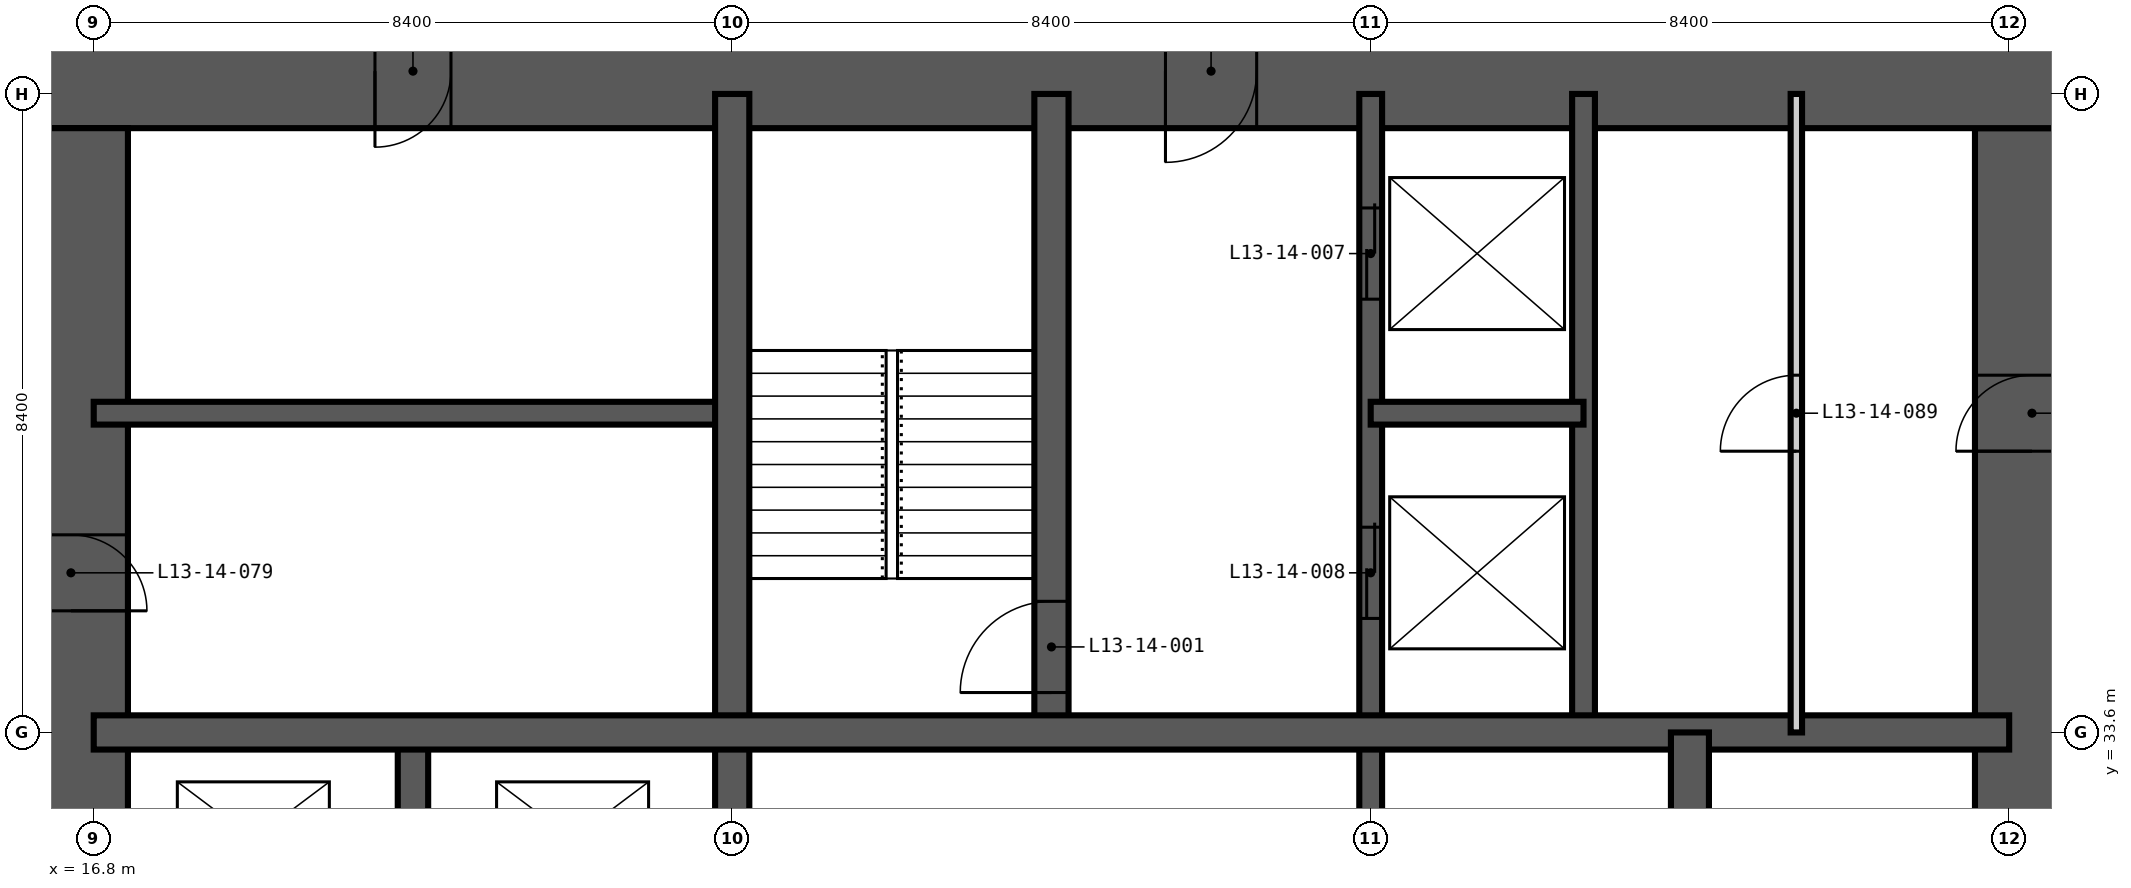
"""IFC4 building model, lengths in metres.
Left out: names, types, materials, properties, quantities, classifications, styles, units other than length and angle.
Written with IfcOpenShell. Run it as: python <this file> out.ifc"""

import sys

from ifc_helpers import new_model, si_unit, direction, frame, frame_2d, origin, place, context, subcontext, project, spatial, rectangle, extrude, element, fill, save


model = new_model("IFC4")
c1 = context("Model", 3, precision=1e-05, world=origin(), true_north=direction((0.0, 1.0)))
c2 = subcontext(c1, "Body", "Model", "MODEL_VIEW")
j1 = project(units=[si_unit("LENGTHUNIT", "METRE"), si_unit("PLANEANGLEUNIT", "RADIAN")], contexts=[c1])
p1 = place(None, origin())
s1 = spatial("IfcSite", under=j1, at=p1, CompositionType="ELEMENT")
p2 = place(p1, origin())
s2 = spatial("IfcBuilding", under=s1, at=p2, CompositionType="ELEMENT")
p3 = place(p2, frame((0.0, 0.0, 55.8)))
s3 = spatial("IfcBuildingStorey", under=s2, at=p3, CompositionType="ELEMENT", Elevation=55.8)
p4 = place(p3, frame((42.3, 17.25, -0.35), z_axis=(0.0, 0.0, 1.0), x_axis=(0.0, 1.0, 0.0)))
e1 = element("IfcWall", 1, at=p4, inside=s3, PredefinedType="SHEAR", context=c2, shape_type="SweptSolid", body=[
    extrude(rectangle(XDim=24.3, YDim=1.5, at=frame_2d((12.15, 0.0))), origin(), (0.0, 0.0, 1.0), 3.6),
])
p5 = place(p4, frame((0.35, 0.0, 0.35)))
e2 = element("IfcOpeningElement", 2, at=p5, cuts=e1, PredefinedType="OPENING", context=c2, shape_type="SweptSolid", body=[
    extrude(rectangle(XDim=1.2, YDim=2.2, at=frame_2d((0.6, 1.1))), frame((0.0, 0.76, 0.0), z_axis=(0.0, -1.0, 0.0), x_axis=(1.0, 0.0, 0.0)), (0.0, 0.0, 1.0), 1.52),
])
p6 = place(p4, frame((11.65, 0.0, 0.35)))
e3 = element("IfcOpeningElement", 3, at=p6, cuts=e1, PredefinedType="OPENING", context=c2, shape_type="SweptSolid", body=[
    extrude(rectangle(XDim=1.0, YDim=2.1, at=frame_2d((0.5, 1.05))), frame((0.0, 0.76, 0.0), z_axis=(0.0, -1.0, 0.0), x_axis=(1.0, 0.0, 0.0)), (0.0, 0.0, 1.0), 1.52),
])
p7 = place(p4, frame((20.05, 0.0, 0.35)))
e4 = element("IfcOpeningElement", 4, at=p7, cuts=e1, PredefinedType="OPENING", context=c2, shape_type="SweptSolid", body=[
    extrude(rectangle(XDim=1.0, YDim=2.1, at=frame_2d((0.5, 1.05))), frame((0.0, 0.76, 0.0), z_axis=(0.0, -1.0, 0.0), x_axis=(1.0, 0.0, 0.0)), (0.0, 0.0, 1.0), 1.52),
])
p8 = place(p3, frame((43.05, 42.3, -0.35), z_axis=(0.0, 0.0, 1.0), x_axis=(-1.0, 0.0, 0.0)))
e5 = element("IfcWall", 5, at=p8, inside=s3, PredefinedType="SHEAR", context=c2, shape_type="SweptSolid", body=[
    extrude(rectangle(XDim=27.3, YDim=1.5, at=frame_2d((13.65, 0.0))), origin(), (0.0, 0.0, 1.0), 3.6),
])
p9 = place(p8, frame((21.55, 0.0, 0.35)))
e6 = element("IfcOpeningElement", 6, at=p9, cuts=e5, PredefinedType="OPENING", context=c2, shape_type="SweptSolid", body=[
    extrude(rectangle(XDim=1.0, YDim=2.1, at=frame_2d((0.5, 1.05))), frame((0.0, 0.76, 0.0), z_axis=(0.0, -1.0, 0.0), x_axis=(1.0, 0.0, 0.0)), (0.0, 0.0, 1.0), 1.52),
])
p10 = place(p8, frame((10.95, 0.0, 0.35)))
e7 = element("IfcOpeningElement", 7, at=p10, cuts=e5, PredefinedType="OPENING", context=c2, shape_type="SweptSolid", body=[
    extrude(rectangle(XDim=1.2, YDim=2.2, at=frame_2d((0.6, 1.1))), frame((0.0, 0.76, 0.0), z_axis=(0.0, -1.0, 0.0), x_axis=(1.0, 0.0, 0.0)), (0.0, 0.0, 1.0), 1.52),
])
p11 = place(p3, frame((16.5, 41.55, -0.35), z_axis=(0.0, 0.0, 1.0), x_axis=(0.0, -1.0, 0.0)))
e8 = element("IfcWall", 8, at=p11, inside=s3, PredefinedType="SHEAR", context=c2, shape_type="SweptSolid", body=[
    extrude(rectangle(XDim=24.3, YDim=1.5, at=frame_2d((12.15, 0.0))), origin(), (0.0, 0.0, 1.0), 3.6),
])
p12 = place(p11, frame((11.25, 0.0, 0.35)))
e9 = element("IfcOpeningElement", 9, at=p12, cuts=e8, PredefinedType="OPENING", context=c2, shape_type="SweptSolid", body=[
    extrude(rectangle(XDim=1.8, YDim=2.2, at=frame_2d((0.9, 1.1))), frame((0.0, 0.76, 0.0), z_axis=(0.0, -1.0, 0.0), x_axis=(1.0, 0.0, 0.0)), (0.0, 0.0, 1.0), 1.52),
])
p13 = place(p11, frame((20.05, 0.0, 0.35)))
e10 = element("IfcOpeningElement", 10, at=p13, cuts=e8, PredefinedType="OPENING", context=c2, shape_type="SweptSolid", body=[
    extrude(rectangle(XDim=1.0, YDim=2.1, at=frame_2d((0.5, 1.05))), frame((0.0, 0.76, 0.0), z_axis=(0.0, -1.0, 0.0), x_axis=(1.0, 0.0, 0.0)), (0.0, 0.0, 1.0), 1.52),
])
p14 = place(p11, frame((5.35, 0.0, 0.35)))
e11 = element("IfcOpeningElement", 11, at=p14, cuts=e8, PredefinedType="OPENING", context=c2, shape_type="SweptSolid", body=[
    extrude(rectangle(XDim=1.0, YDim=2.1, at=frame_2d((0.5, 1.05))), frame((0.0, 0.76, 0.0), z_axis=(0.0, -1.0, 0.0), x_axis=(1.0, 0.0, 0.0)), (0.0, 0.0, 1.0), 1.52),
])
p15 = place(p3, frame((33.6, 16.8, -0.35), z_axis=(0.0, 0.0, 1.0), x_axis=(0.0, 1.0, 0.0)))
e12 = element("IfcWall", 12, at=p15, inside=s3, PredefinedType="SHEAR", context=c2, shape_type="SweptSolid", body=[
    extrude(rectangle(XDim=25.2, YDim=0.3, at=frame_2d((12.6, 0.0))), origin(), (0.0, 0.0, 1.0), 3.6),
])
p16 = place(p15, frame((22.5, 0.0, 0.35)))
e13 = element("IfcOpeningElement", 13, at=p16, cuts=e12, PredefinedType="OPENING", context=c2, shape_type="SweptSolid", body=[
    extrude(rectangle(XDim=1.2, YDim=2.2, at=frame_2d((0.6, 1.1))), frame((0.0, 0.16, 0.0), z_axis=(0.0, -1.0, 0.0), x_axis=(1.0, 0.0, 0.0)), (0.0, 0.0, 1.0), 0.32),
])
p17 = place(p15, frame((18.3, 0.0, 0.35)))
e14 = element("IfcOpeningElement", 14, at=p17, cuts=e12, PredefinedType="OPENING", context=c2, shape_type="SweptSolid", body=[
    extrude(rectangle(XDim=1.2, YDim=2.2, at=frame_2d((0.6, 1.1))), frame((0.0, 0.16, 0.0), z_axis=(0.0, -1.0, 0.0), x_axis=(1.0, 0.0, 0.0)), (0.0, 0.0, 1.0), 0.32),
])
p18 = place(p15, frame((12.1, 0.0, 0.35)))
e15 = element("IfcOpeningElement", 15, at=p18, cuts=e12, PredefinedType="OPENING", context=c2, shape_type="SweptSolid", body=[
    extrude(rectangle(XDim=1.0, YDim=2.1, at=frame_2d((0.5, 1.05))), frame((0.0, 0.16, 0.0), z_axis=(0.0, -1.0, 0.0), x_axis=(1.0, 0.0, 0.0)), (0.0, 0.0, 1.0), 0.32),
])
for number, where, z_axis, x_axis in (
    (16, (36.4, 33.6, -0.35), (0.0, 0.0, 1.0), (0.0, 1.0, 0.0)),
    (17, (16.8, 37.8, -0.35), (0.0, 0.0, 1.0), (1.0, 0.0, 0.0)),
):
    element("IfcWall", number, at=place(p3, frame(where, z_axis=z_axis, x_axis=x_axis)), inside=s3, PredefinedType="SHEAR", context=c2, shape_type="SweptSolid", body=[
        extrude(rectangle(XDim=8.4, YDim=0.3, at=frame_2d((4.2, 0.0))), origin(), (0.0, 0.0, 1.0), 3.6),
    ])
p19 = place(p3, frame((33.6, 37.8, -0.35), z_axis=(0.0, 0.0, 1.0), x_axis=(1.0, 0.0, 0.0)))
e18 = element("IfcWall", 18, at=p19, inside=s3, PredefinedType="SHEAR", context=c2, shape_type="SweptSolid", body=[
    extrude(rectangle(XDim=2.8, YDim=0.3, at=frame_2d((1.4, 0.0))), origin(), (0.0, 0.0, 1.0), 3.6),
])
p20 = place(p3, frame((21.0, 30.8, -0.35), z_axis=(0.0, 0.0, 1.0), x_axis=(0.0, 1.0, 0.0)))
e19 = element("IfcWall", 19, at=p20, inside=s3, PredefinedType="SHEAR", context=c2, shape_type="SweptSolid", body=[
    extrude(rectangle(XDim=2.8, YDim=0.4, at=frame_2d((1.4, 0.0))), origin(), (0.0, 0.0, 1.0), 3.6),
])
p21 = place(p3, frame((25.2, 16.8, -0.35), z_axis=(0.0, 0.0, 1.0), x_axis=(0.0, 1.0, 0.0)))
e20 = element("IfcWall", 20, at=p21, inside=s3, PredefinedType="SHEAR", context=c2, shape_type="SweptSolid", body=[
    extrude(rectangle(XDim=25.2, YDim=0.45, at=frame_2d((12.6, 0.0))), origin(), (0.0, 0.0, 1.0), 3.6),
])
p22 = place(p3, frame((29.4, 33.6, -0.35), z_axis=(0.0, 0.0, 1.0), x_axis=(0.0, 1.0, 0.0)))
e21 = element("IfcWall", 21, at=p22, inside=s3, PredefinedType="SHEAR", context=c2, shape_type="SweptSolid", body=[
    extrude(rectangle(XDim=8.4, YDim=0.45, at=frame_2d((4.2, 0.0))), origin(), (0.0, 0.0, 1.0), 3.6),
])
p23 = place(p22, frame((0.525, 0.0, 0.35)))
e22 = element("IfcOpeningElement", 22, at=p23, cuts=e21, PredefinedType="OPENING", context=c2, shape_type="SweptSolid", body=[
    extrude(rectangle(XDim=1.2, YDim=2.2, at=frame_2d((0.6, 1.1))), frame((0.0, 0.235, 0.0), z_axis=(0.0, -1.0, 0.0), x_axis=(1.0, 0.0, 0.0)), (0.0, 0.0, 1.0), 0.47),
])
p24 = place(p3, frame((16.8, 33.6, -0.35), z_axis=(0.0, 0.0, 1.0), x_axis=(1.0, 0.0, 0.0)))
e23 = element("IfcWall", 23, at=p24, inside=s3, PredefinedType="SHEAR", context=c2, shape_type="SweptSolid", body=[
    extrude(rectangle(XDim=25.2, YDim=0.45, at=frame_2d((12.6, 0.0))), origin(), (0.0, 0.0, 1.0), 3.6),
])
p25 = place(p3, frame((37.8, 30.8, -0.35), z_axis=(0.0, 0.0, 1.0), x_axis=(0.0, 1.0, 0.0)))
e24 = element("IfcWall", 24, at=p25, inside=s3, PredefinedType="SHEAR", context=c2, shape_type="SweptSolid", body=[
    extrude(rectangle(XDim=2.8, YDim=0.5, at=frame_2d((1.4, 0.0))), origin(), (0.0, 0.0, 1.0), 3.6),
])
p26 = place(p3, frame((39.2, 33.6, 0.0), z_axis=(0.0, 0.0, 1.0), x_axis=(0.0, 1.0, 0.0)))
e25 = element("IfcWall", 25, at=p26, inside=s3, PredefinedType="PARTITIONING", context=c2, shape_type="SweptSolid", body=[
    extrude(rectangle(XDim=8.4, YDim=0.15, at=frame_2d((4.2, 0.0))), origin(), (0.0, 0.0, 1.0), 3.25),
])
p27 = place(p26, frame((3.7, 0.0, 0.0)))
e26 = element("IfcOpeningElement", 26, at=p27, cuts=e25, PredefinedType="OPENING", context=c2, shape_type="SweptSolid", body=[
    extrude(rectangle(XDim=1.0, YDim=2.1, at=frame_2d((0.5, 1.05))), frame((0.0, 0.085, 0.0), z_axis=(0.0, -1.0, 0.0), x_axis=(1.0, 0.0, 0.0)), (0.0, 0.0, 1.0), 0.17),
])
p28 = place(p23, origin())
e27 = element("IfcDoor", 27, at=p28, inside=s3, OperationType="SINGLE_SWING_LEFT", PredefinedType="DOOR", context=c2, shape_type="SweptSolid", body=[
    extrude(rectangle(XDim=1.2, YDim=2.2, at=frame_2d((0.6, 1.1))), frame((0.0, 0.025, 0.0), z_axis=(0.0, -1.0, 0.0), x_axis=(1.0, 0.0, 0.0)), (0.0, 0.0, 1.0), 0.05),
])
fill(e22, e27)
p29 = place(p16, origin())
e28 = element("IfcDoor", 28, at=p29, inside=s3, OperationType="DOUBLE_DOOR_SLIDING", PredefinedType="DOOR", context=c2, shape_type="SweptSolid", body=[
    extrude(rectangle(XDim=1.2, YDim=2.2, at=frame_2d((0.6, 1.1))), frame((0.0, 0.025, 0.0), z_axis=(0.0, -1.0, 0.0), x_axis=(1.0, 0.0, 0.0)), (0.0, 0.0, 1.0), 0.05),
])
fill(e13, e28)
p30 = place(p17, origin())
e29 = element("IfcDoor", 29, at=p30, inside=s3, OperationType="DOUBLE_DOOR_SLIDING", PredefinedType="DOOR", context=c2, shape_type="SweptSolid", body=[
    extrude(rectangle(XDim=1.2, YDim=2.2, at=frame_2d((0.6, 1.1))), frame((0.0, 0.025, 0.0), z_axis=(0.0, -1.0, 0.0), x_axis=(1.0, 0.0, 0.0)), (0.0, 0.0, 1.0), 0.05),
])
fill(e14, e29)
p31 = place(p14, origin())
e30 = element("IfcDoor", 30, at=p31, inside=s3, OperationType="SINGLE_SWING_RIGHT", PredefinedType="DOOR", context=c2, shape_type="SweptSolid", body=[
    extrude(rectangle(XDim=1.0, YDim=2.1, at=frame_2d((0.5, 1.05))), frame((0.0, 0.025, 0.0), z_axis=(0.0, -1.0, 0.0), x_axis=(1.0, 0.0, 0.0)), (0.0, 0.0, 1.0), 0.05),
])
fill(e11, e30)
p32 = place(p9, origin())
e31 = element("IfcDoor", 31, at=p32, inside=s3, OperationType="SINGLE_SWING_RIGHT", PredefinedType="DOOR", context=c2, shape_type="SweptSolid", body=[
    extrude(rectangle(XDim=1.0, YDim=2.1, at=frame_2d((0.5, 1.05))), frame((0.0, 0.025, 0.0), z_axis=(0.0, -1.0, 0.0), x_axis=(1.0, 0.0, 0.0)), (0.0, 0.0, 1.0), 0.05),
])
fill(e6, e31)
p33 = place(p10, origin())
e32 = element("IfcDoor", 32, at=p33, inside=s3, OperationType="SINGLE_SWING_RIGHT", PredefinedType="DOOR", context=c2, shape_type="SweptSolid", body=[
    extrude(rectangle(XDim=1.2, YDim=2.2, at=frame_2d((0.6, 1.1))), frame((0.0, 0.025, 0.0), z_axis=(0.0, -1.0, 0.0), x_axis=(1.0, 0.0, 0.0)), (0.0, 0.0, 1.0), 0.05),
])
fill(e7, e32)
p34 = place(p7, origin())
e33 = element("IfcDoor", 33, at=p34, inside=s3, OperationType="SINGLE_SWING_LEFT", PredefinedType="DOOR", context=c2, shape_type="SweptSolid", body=[
    extrude(rectangle(XDim=1.0, YDim=2.1, at=frame_2d((0.5, 1.05))), frame((0.0, 0.025, 0.0), z_axis=(0.0, -1.0, 0.0), x_axis=(1.0, 0.0, 0.0)), (0.0, 0.0, 1.0), 0.05),
])
fill(e4, e33)
p35 = place(p27, origin())
e34 = element("IfcDoor", 34, at=p35, inside=s3, OperationType="SINGLE_SWING_LEFT", PredefinedType="DOOR", context=c2, shape_type="SweptSolid", body=[
    extrude(rectangle(XDim=1.0, YDim=2.1, at=frame_2d((0.5, 1.05))), frame((0.0, 0.025, 0.0), z_axis=(0.0, -1.0, 0.0), x_axis=(1.0, 0.0, 0.0)), (0.0, 0.0, 1.0), 0.05),
])
fill(e26, e34)
save(model, sys.argv[1])
